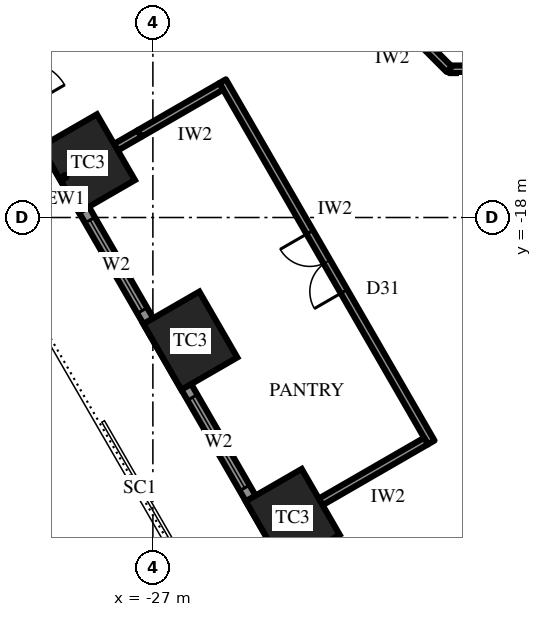
"""IFC4 building model, lengths in metres.
Left out: names, types, materials, properties, quantities, classifications, styles, units other than length and angle.
Written with IfcOpenShell. Run it as: python <this file> out.ifc"""

import sys

from ifc_helpers import new_model, si_unit, direction, frame, frame_2d, origin, origin_2d, place, context, subcontext, project, spatial, rectangle, extrude, element, fill, save


model = new_model("IFC4")
c1 = context("Model", 3, precision=1e-05, world=origin(), true_north=direction((0.0, 1.0)))
c2 = subcontext(c1, "Body", "Model", "MODEL_VIEW")
j1 = project(units=[si_unit("LENGTHUNIT", "METRE"), si_unit("PLANEANGLEUNIT", "RADIAN")], contexts=[c1])
p1 = place(None, origin())
s1 = spatial("IfcSite", under=j1, at=p1, CompositionType="ELEMENT")
p2 = place(p1, origin())
s2 = spatial("IfcBuilding", under=s1, at=p2, CompositionType="ELEMENT")
p3 = place(p2, frame((0.0, 0.0, 82.3)))
s3 = spatial("IfcBuildingStorey", under=s2, at=p3, CompositionType="ELEMENT", Elevation=82.3)
for number, where, z_axis, x_axis in (
    (1, (-28.709, -16.575, 0.0), (0.0, 0.0, 1.0), (0.5, -0.866, 0.0)),
    (2, (-26.014, -21.242, 0.0), (0.0, 0.0, 1.0), (0.5, -0.866, 0.0)),
    (3, (-23.32, -25.908, 0.0), (0.0, 0.0, 1.0), (0.5, -0.866, 0.0)),
):
    element("IfcColumn", number, at=place(p3, frame(where, z_axis=z_axis, x_axis=x_axis)), inside=s3, PredefinedType="COLUMN", context=c2, shape_type="SweptSolid", body=[
        extrude(rectangle(XDim=2.0, YDim=1.7, at=origin_2d()), origin(), (0.0, 0.0, 1.0), 4.2),
    ])
p4 = place(p3, frame((-37.398, -2.925, 0.0), z_axis=(0.0, 0.0, 1.0), x_axis=(0.499999163675, -0.866025886636, 0.0)))
e4 = element("IfcWall", 4, at=p4, inside=s3, PredefinedType="SOLIDWALL", context=c2, shape_type="SweptSolid", body=[
    extrude(rectangle(XDim=32.332, YDim=0.3, at=frame_2d((16.166, 0.0))), origin(), (0.0, 0.0, 1.0), 2.7),
])
p5 = place(p4, frame((1.319, 0.0, 0.6)))
e5 = element("IfcOpeningElement", 5, at=p5, cuts=e4, PredefinedType="OPENING", context=c2, shape_type="SweptSolid", body=[
    extrude(rectangle(XDim=2.75, YDim=1.85, at=frame_2d((1.375, 0.925))), frame((0.0, 0.16, 0.0), z_axis=(0.0, -1.0, 0.0), x_axis=(1.0, 0.0, 0.0)), (0.0, 0.0, 1.0), 0.32),
])
p6 = place(p4, frame((6.708, 0.0, 0.6)))
e6 = element("IfcOpeningElement", 6, at=p6, cuts=e4, PredefinedType="OPENING", context=c2, shape_type="SweptSolid", body=[
    extrude(rectangle(XDim=2.75, YDim=1.85, at=frame_2d((1.375, 0.925))), frame((0.0, 0.16, 0.0), z_axis=(0.0, -1.0, 0.0), x_axis=(1.0, 0.0, 0.0)), (0.0, 0.0, 1.0), 0.32),
])
p7 = place(p4, frame((12.872, 0.0, 0.0)))
e7 = element("IfcOpeningElement", 7, at=p7, cuts=e4, PredefinedType="OPENING", context=c2, shape_type="SweptSolid", body=[
    extrude(rectangle(XDim=1.2, YDim=2.4, at=frame_2d((0.6, 1.2))), frame((0.0, 0.16, 0.0), z_axis=(0.0, -1.0, 0.0), x_axis=(1.0, 0.0, 0.0)), (0.0, 0.0, 1.0), 0.32),
])
p8 = place(p4, frame((17.485, 0.0, 0.6)))
e8 = element("IfcOpeningElement", 8, at=p8, cuts=e4, PredefinedType="OPENING", context=c2, shape_type="SweptSolid", body=[
    extrude(rectangle(XDim=2.75, YDim=1.85, at=frame_2d((1.375, 0.925))), frame((0.0, 0.16, 0.0), z_axis=(0.0, -1.0, 0.0), x_axis=(1.0, 0.0, 0.0)), (0.0, 0.0, 1.0), 0.32),
])
p9 = place(p4, frame((22.874, 0.0, 0.6)))
e9 = element("IfcOpeningElement", 9, at=p9, cuts=e4, PredefinedType="OPENING", context=c2, shape_type="SweptSolid", body=[
    extrude(rectangle(XDim=2.75, YDim=1.85, at=frame_2d((1.375, 0.925))), frame((0.0, 0.16, 0.0), z_axis=(0.0, -1.0, 0.0), x_axis=(1.0, 0.0, 0.0)), (0.0, 0.0, 1.0), 0.32),
])
p10 = place(p4, frame((28.262, 0.0, 0.6)))
e10 = element("IfcOpeningElement", 10, at=p10, cuts=e4, PredefinedType="OPENING", context=c2, shape_type="SweptSolid", body=[
    extrude(rectangle(XDim=2.75, YDim=1.85, at=frame_2d((1.375, 0.925))), frame((0.0, 0.16, 0.0), z_axis=(0.0, -1.0, 0.0), x_axis=(1.0, 0.0, 0.0)), (0.0, 0.0, 1.0), 0.32),
])
p11 = place(p3, frame((-25.165, -14.413, 0.0), z_axis=(0.0, 0.0, 1.0), x_axis=(0.500009305389, -0.866020031249, 0.0)))
e11 = element("IfcWall", 11, at=p11, inside=s3, PredefinedType="PARTITIONING", context=c2, shape_type="SweptSolid", body=[
    extrude(rectangle(XDim=10.977, YDim=0.2, at=frame_2d((5.489, 0.0))), origin(), (0.0, 0.0, 1.0), 4.0),
])
p12 = place(p11, frame((4.589, 0.0, 0.0)))
e12 = element("IfcOpeningElement", 12, at=p12, cuts=e11, PredefinedType="OPENING", context=c2, shape_type="SweptSolid", body=[
    extrude(rectangle(XDim=1.8, YDim=2.4, at=frame_2d((0.9, 1.2))), frame((0.0, 0.11, 0.0), z_axis=(0.0, -1.0, 0.0), x_axis=(1.0, 0.0, 0.0)), (0.0, 0.0, 1.0), 0.22),
])
p13 = place(p3, frame((-25.201, -14.55, 0.0), z_axis=(0.0, 0.0, 1.0), x_axis=(-0.866020232408, -0.500008956979, 0.0)))
e13 = element("IfcWall", 13, at=p13, inside=s3, PredefinedType="PARTITIONING", context=c2, shape_type="SweptSolid", body=[
    extrude(rectangle(XDim=2.483, YDim=0.2, at=frame_2d((1.242, 0.0))), origin(), (0.0, 0.0, 1.0), 4.0),
])
p14 = place(p3, frame((-27.352, -15.792, 0.0), z_axis=(0.0, 0.0, 1.0), x_axis=(-0.866117509073, -0.499840435016, 0.0)))
e14 = element("IfcWall", 14, at=p14, inside=s3, PredefinedType="PARTITIONING", context=c2, shape_type="SweptSolid", body=[
    extrude(rectangle(XDim=0.717, YDim=0.2, at=frame_2d((0.358, 0.0))), origin(), (0.0, 0.0, 1.0), 2.992),
])
p15 = place(p3, frame((-19.813, -23.883, 0.0), z_axis=(0.0, 0.0, 1.0), x_axis=(-0.866008981251, -0.500028443584, 0.0)))
e15 = element("IfcWall", 15, at=p15, inside=s3, PredefinedType="PARTITIONING", context=c2, shape_type="SweptSolid", body=[
    extrude(rectangle(XDim=3.2, YDim=0.2, at=frame_2d((1.6, 0.0))), origin(), (0.0, 0.0, 1.0), 2.992),
])
p16 = place(p3, frame((-17.6, -14.1, 0.0), z_axis=(0.0, 0.0, 1.0), x_axis=(-1.0, 0.0, 0.0)))
e16 = element("IfcWall", 16, at=p16, inside=s3, PredefinedType="PARTITIONING", context=c2, shape_type="SweptSolid", body=[
    extrude(rectangle(XDim=1.6, YDim=0.2, at=frame_2d((0.8, 0.0))), origin(), (0.0, 0.0, 1.0), 4.0),
])
p17 = place(p3, frame((-19.2, -14.1, 0.0), z_axis=(0.0, 0.0, 1.0), x_axis=(-0.707106781187, 0.707106781187, 0.0)))
e17 = element("IfcWall", 17, at=p17, inside=s3, PredefinedType="PARTITIONING", context=c2, shape_type="SweptSolid", body=[
    extrude(rectangle(XDim=2.546, YDim=0.2, at=frame_2d((1.273, 0.0))), origin(), (0.0, 0.0, 1.0), 4.0),
])
p18 = place(p8, origin())
e18 = element("IfcWindow", 18, at=p18, inside=s3, PartitioningType="SINGLE_PANEL", PredefinedType="WINDOW", context=c2, shape_type="SweptSolid", body=[
    extrude(rectangle(XDim=2.75, YDim=1.85, at=frame_2d((1.375, 0.925))), frame((0.0, 0.03, 0.0), z_axis=(0.0, -1.0, 0.0), x_axis=(1.0, 0.0, 0.0)), (0.0, 0.0, 1.0), 0.06),
])
fill(e8, e18)
p19 = place(p9, origin())
e19 = element("IfcWindow", 19, at=p19, inside=s3, PartitioningType="SINGLE_PANEL", PredefinedType="WINDOW", context=c2, shape_type="SweptSolid", body=[
    extrude(rectangle(XDim=2.75, YDim=1.85, at=frame_2d((1.375, 0.925))), frame((0.0, 0.03, 0.0), z_axis=(0.0, -1.0, 0.0), x_axis=(1.0, 0.0, 0.0)), (0.0, 0.0, 1.0), 0.06),
])
fill(e9, e19)
p20 = place(p12, frame((1.8, 0.0, 0.0), z_axis=(0.0, 0.0, 1.0), x_axis=(-1.0, 0.0, 0.0)))
e20 = element("IfcDoor", 20, at=p20, inside=s3, OperationType="DOUBLE_DOOR_SINGLE_SWING", PredefinedType="DOOR", context=c2, shape_type="SweptSolid", body=[
    extrude(rectangle(XDim=1.8, YDim=2.4, at=frame_2d((0.9, 1.2))), frame((0.0, 0.025, 0.0), z_axis=(0.0, -1.0, 0.0), x_axis=(1.0, 0.0, 0.0)), (0.0, 0.0, 1.0), 0.05),
])
fill(e12, e20)
save(model, sys.argv[1])
